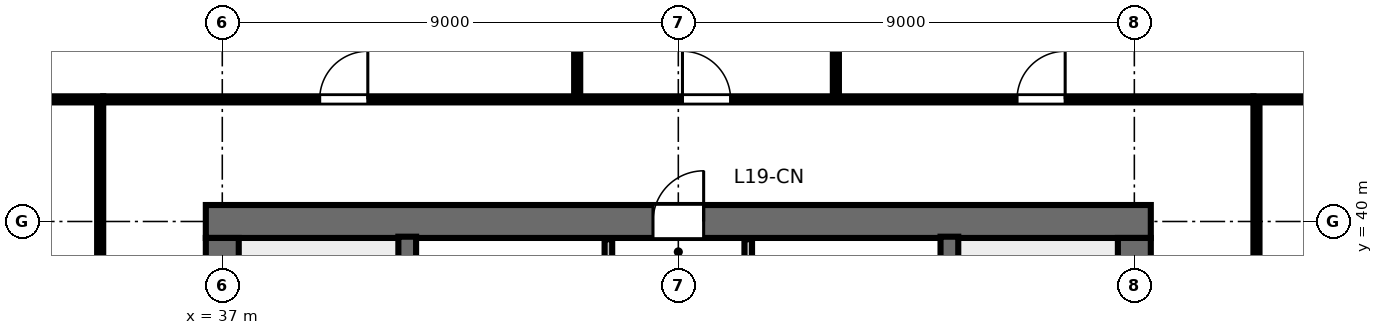
"""IFC4 building model, lengths in metres.
Left out: names, types, materials, properties, quantities, classifications, styles, units other than length and angle.
Written with IfcOpenShell. Run it as: python <this file> out.ifc"""

import sys

from ifc_helpers import new_model, si_unit, direction, frame, frame_2d, origin, place, context, subcontext, project, spatial, rectangle, extrude, element, fill, save


model = new_model("IFC4")
c1 = context("Model", 3, precision=1e-05, world=origin(), true_north=direction((0.0, 1.0)))
c2 = subcontext(c1, "Body", "Model", "MODEL_VIEW")
j1 = project(units=[si_unit("LENGTHUNIT", "METRE"), si_unit("PLANEANGLEUNIT", "RADIAN")], contexts=[c1])
p1 = place(None, origin())
s1 = spatial("IfcSite", under=j1, at=p1, CompositionType="ELEMENT")
p2 = place(p1, origin())
s2 = spatial("IfcBuilding", under=s1, at=p2, CompositionType="ELEMENT")
p3 = place(p2, frame((0.0, 0.0, 74.8)))
s3 = spatial("IfcBuildingStorey", under=s2, at=p3, CompositionType="ELEMENT", Elevation=74.8)
p4 = place(p3, frame((36.675, 40.0, 0.0), z_axis=(0.0, 0.0, 1.0), x_axis=(1.0, 0.0, 0.0)))
e1 = element("IfcWall", 1, at=p4, inside=s3, PredefinedType="SHEAR", context=c2, shape_type="SweptSolid", body=[
    extrude(rectangle(XDim=18.65, YDim=0.65, at=frame_2d((9.325, 0.0))), origin(), (0.0, 0.0, 1.0), 3.36),
])
p5 = place(p4, frame((8.825, 0.0, 0.0)))
e2 = element("IfcOpeningElement", 2, at=p5, cuts=e1, PredefinedType="OPENING", context=c2, shape_type="SweptSolid", body=[
    extrude(rectangle(XDim=1.0, YDim=2.15, at=frame_2d((0.5, 1.075))), frame((0.0, 0.335, 0.0), z_axis=(0.0, -1.0, 0.0), x_axis=(1.0, 0.0, 0.0)), (0.0, 0.0, 1.0), 0.67),
])
p6 = place(p3, frame((37.0, 24.325, 0.0), z_axis=(0.0, 0.0, 1.0), x_axis=(0.0, 1.0, 0.0)))
e3 = element("IfcWall", 3, at=p6, inside=s3, PredefinedType="SHEAR", context=c2, shape_type="SweptSolid", body=[
    extrude(rectangle(XDim=15.35, YDim=0.65, at=frame_2d((7.675, 0.0))), origin(), (0.0, 0.0, 1.0), 3.36),
])
p7 = place(p6, frame((5.2, 0.0, 0.0)))
e4 = element("IfcOpeningElement", 4, at=p7, cuts=e3, PredefinedType="OPENING", context=c2, shape_type="SweptSolid", body=[
    extrude(rectangle(XDim=1.15, YDim=2.15, at=frame_2d((0.575, 1.075))), frame((0.0, 0.335, 0.0), z_axis=(0.0, -1.0, 0.0), x_axis=(1.0, 0.0, 0.0)), (0.0, 0.0, 1.0), 0.67),
])
p8 = place(p3, frame((55.0, 24.325, 0.0), z_axis=(0.0, 0.0, 1.0), x_axis=(0.0, 1.0, 0.0)))
e5 = element("IfcWall", 5, at=p8, inside=s3, PredefinedType="SHEAR", context=c2, shape_type="SweptSolid", body=[
    extrude(rectangle(XDim=15.35, YDim=0.65, at=frame_2d((7.675, 0.0))), origin(), (0.0, 0.0, 1.0), 3.36),
])
p9 = place(p8, frame((5.2, 0.0, 0.0)))
e6 = element("IfcOpeningElement", 6, at=p9, cuts=e5, PredefinedType="OPENING", context=c2, shape_type="SweptSolid", body=[
    extrude(rectangle(XDim=1.15, YDim=2.15, at=frame_2d((0.575, 1.075))), frame((0.0, 0.335, 0.0), z_axis=(0.0, -1.0, 0.0), x_axis=(1.0, 0.0, 0.0)), (0.0, 0.0, 1.0), 0.67),
])
for number, where, z_axis, x_axis in (
    (7, (40.65, 32.0, 0.0), (0.0, 0.0, 1.0), (0.0, 1.0, 0.0)),
    (8, (51.35, 32.0, 0.0), (0.0, 0.0, 1.0), (0.0, 1.0, 0.0)),
):
    element("IfcWall", number, at=place(p3, frame(where, z_axis=z_axis, x_axis=x_axis)), inside=s3, PredefinedType="SHEAR", context=c2, shape_type="SweptSolid", body=[
        extrude(rectangle(XDim=7.7, YDim=0.35, at=frame_2d((3.85, 0.0))), origin(), (0.0, 0.0, 1.0), 3.6),
    ])
p10 = place(p3, frame((44.62, 35.72, 0.0), z_axis=(0.0, 0.0, 1.0), x_axis=(0.0, 1.0, 0.0)))
e9 = element("IfcWall", 9, at=p10, inside=s3, PredefinedType="PARTITIONING", context=c2, shape_type="SweptSolid", body=[
    extrude(rectangle(XDim=3.93, YDim=0.15, at=frame_2d((1.965, 0.0))), origin(), (0.0, 0.0, 1.0), 3.36),
])
p11 = place(p10, frame((1.5, 0.0, 0.0)))
e10 = element("IfcOpeningElement", 10, at=p11, cuts=e9, PredefinedType="OPENING", context=c2, shape_type="SweptSolid", body=[
    extrude(rectangle(XDim=0.9, YDim=2.15, at=frame_2d((0.45, 1.075))), frame((0.0, 0.085, 0.0), z_axis=(0.0, -1.0, 0.0), x_axis=(1.0, 0.0, 0.0)), (0.0, 0.0, 1.0), 0.17),
])
p12 = place(p3, frame((47.38, 35.72, 0.0), z_axis=(0.0, 0.0, 1.0), x_axis=(0.0, 1.0, 0.0)))
e11 = element("IfcWall", 11, at=p12, inside=s3, PredefinedType="PARTITIONING", context=c2, shape_type="SweptSolid", body=[
    extrude(rectangle(XDim=3.93, YDim=0.15, at=frame_2d((1.965, 0.0))), origin(), (0.0, 0.0, 1.0), 3.36),
])
p13 = place(p12, frame((1.5, 0.0, 0.0)))
e12 = element("IfcOpeningElement", 12, at=p13, cuts=e11, PredefinedType="OPENING", context=c2, shape_type="SweptSolid", body=[
    extrude(rectangle(XDim=0.9, YDim=2.15, at=frame_2d((0.45, 1.075))), frame((0.0, 0.085, 0.0), z_axis=(0.0, -1.0, 0.0), x_axis=(1.0, 0.0, 0.0)), (0.0, 0.0, 1.0), 0.17),
])
p14 = place(p3, frame((44.004, 42.41, 0.0), z_axis=(0.0, 0.0, 1.0), x_axis=(0.0, 1.0, 0.0)))
e13 = element("IfcWall", 13, at=p14, inside=s3, PredefinedType="PARTITIONING", context=c2, shape_type="SweptSolid", body=[
    extrude(rectangle(XDim=11.41, YDim=0.12, at=frame_2d((5.705, 0.0))), origin(), (0.0, 0.0, 1.0), 2.64),
])
p15 = place(p14, frame((1.4, 0.0, 0.0)))
e14 = element("IfcOpeningElement", 14, at=p15, cuts=e13, PredefinedType="OPENING", context=c2, shape_type="SweptSolid", body=[
    extrude(rectangle(XDim=0.9, YDim=2.15, at=frame_2d((0.45, 1.075))), frame((0.0, 0.07, 0.0), z_axis=(0.0, -1.0, 0.0), x_axis=(1.0, 0.0, 0.0)), (0.0, 0.0, 1.0), 0.14),
])
p16 = place(p3, frame((49.11, 42.41, 0.0), z_axis=(0.0, 0.0, 1.0), x_axis=(0.0, 1.0, 0.0)))
e15 = element("IfcWall", 15, at=p16, inside=s3, PredefinedType="PARTITIONING", context=c2, shape_type="SweptSolid", body=[
    extrude(rectangle(XDim=11.41, YDim=0.12, at=frame_2d((5.705, 0.0))), origin(), (0.0, 0.0, 1.0), 2.64),
])
p17 = place(p16, frame((1.4, 0.0, 0.0)))
e16 = element("IfcOpeningElement", 16, at=p17, cuts=e15, PredefinedType="OPENING", context=c2, shape_type="SweptSolid", body=[
    extrude(rectangle(XDim=0.9, YDim=2.15, at=frame_2d((0.45, 1.075))), frame((0.0, 0.07, 0.0), z_axis=(0.0, -1.0, 0.0), x_axis=(1.0, 0.0, 0.0)), (0.0, 0.0, 1.0), 0.14),
])
p18 = place(p3, frame((34.65, 42.41, 0.0), z_axis=(0.0, 0.0, 1.0), x_axis=(1.0, 0.0, 0.0)))
e17 = element("IfcWall", 17, at=p18, inside=s3, PredefinedType="PARTITIONING", context=c2, shape_type="SweptSolid", body=[
    extrude(rectangle(XDim=22.7, YDim=0.12, at=frame_2d((11.35, 0.0))), origin(), (0.0, 0.0, 1.0), 2.64),
])
p19 = place(p18, frame((4.272, 0.0, 0.0)))
e18 = element("IfcOpeningElement", 18, at=p19, cuts=e17, PredefinedType="OPENING", context=c2, shape_type="SweptSolid", body=[
    extrude(rectangle(XDim=0.95, YDim=2.15, at=frame_2d((0.475, 1.075))), frame((0.0, 0.07, 0.0), z_axis=(0.0, -1.0, 0.0), x_axis=(1.0, 0.0, 0.0)), (0.0, 0.0, 1.0), 0.14),
])
p20 = place(p18, frame((11.432, 0.0, 0.0)))
e19 = element("IfcOpeningElement", 19, at=p20, cuts=e17, PredefinedType="OPENING", context=c2, shape_type="SweptSolid", body=[
    extrude(rectangle(XDim=0.95, YDim=2.15, at=frame_2d((0.475, 1.075))), frame((0.0, 0.07, 0.0), z_axis=(0.0, -1.0, 0.0), x_axis=(1.0, 0.0, 0.0)), (0.0, 0.0, 1.0), 0.14),
])
p21 = place(p18, frame((18.035, 0.0, 0.0)))
e20 = element("IfcOpeningElement", 20, at=p21, cuts=e17, PredefinedType="OPENING", context=c2, shape_type="SweptSolid", body=[
    extrude(rectangle(XDim=0.95, YDim=2.15, at=frame_2d((0.475, 1.075))), frame((0.0, 0.07, 0.0), z_axis=(0.0, -1.0, 0.0), x_axis=(1.0, 0.0, 0.0)), (0.0, 0.0, 1.0), 0.14),
])
p22 = place(p3, frame((34.59, 21.65, 0.0), z_axis=(0.0, 0.0, 1.0), x_axis=(0.0, 1.0, 0.0)))
e21 = element("IfcWall", 21, at=p22, inside=s3, PredefinedType="PARTITIONING", context=c2, shape_type="SweptSolid", body=[
    extrude(rectangle(XDim=20.7, YDim=0.12, at=frame_2d((10.35, 0.0))), origin(), (0.0, 0.0, 1.0), 2.64),
])
p23 = place(p22, frame((2.105, 0.0, 0.0)))
e22 = element("IfcOpeningElement", 22, at=p23, cuts=e21, PredefinedType="OPENING", context=c2, shape_type="SweptSolid", body=[
    extrude(rectangle(XDim=0.95, YDim=2.15, at=frame_2d((0.475, 1.075))), frame((0.0, 0.07, 0.0), z_axis=(0.0, -1.0, 0.0), x_axis=(1.0, 0.0, 0.0)), (0.0, 0.0, 1.0), 0.14),
])
p24 = place(p22, frame((7.369, 0.0, 0.0)))
e23 = element("IfcOpeningElement", 23, at=p24, cuts=e21, PredefinedType="OPENING", context=c2, shape_type="SweptSolid", body=[
    extrude(rectangle(XDim=0.95, YDim=2.15, at=frame_2d((0.475, 1.075))), frame((0.0, 0.07, 0.0), z_axis=(0.0, -1.0, 0.0), x_axis=(1.0, 0.0, 0.0)), (0.0, 0.0, 1.0), 0.14),
])
p25 = place(p22, frame((15.139, 0.0, 0.0)))
e24 = element("IfcOpeningElement", 24, at=p25, cuts=e21, PredefinedType="OPENING", context=c2, shape_type="SweptSolid", body=[
    extrude(rectangle(XDim=0.95, YDim=2.15, at=frame_2d((0.475, 1.075))), frame((0.0, 0.07, 0.0), z_axis=(0.0, -1.0, 0.0), x_axis=(1.0, 0.0, 0.0)), (0.0, 0.0, 1.0), 0.14),
])
p26 = place(p3, frame((57.41, 21.65, 0.0), z_axis=(0.0, 0.0, 1.0), x_axis=(0.0, 1.0, 0.0)))
e25 = element("IfcWall", 25, at=p26, inside=s3, PredefinedType="PARTITIONING", context=c2, shape_type="SweptSolid", body=[
    extrude(rectangle(XDim=20.7, YDim=0.12, at=frame_2d((10.35, 0.0))), origin(), (0.0, 0.0, 1.0), 2.64),
])
p27 = place(p26, frame((4.931, 0.0, 0.0)))
e26 = element("IfcOpeningElement", 26, at=p27, cuts=e25, PredefinedType="OPENING", context=c2, shape_type="SweptSolid", body=[
    extrude(rectangle(XDim=0.95, YDim=2.15, at=frame_2d((0.475, 1.075))), frame((0.0, 0.07, 0.0), z_axis=(0.0, -1.0, 0.0), x_axis=(1.0, 0.0, 0.0)), (0.0, 0.0, 1.0), 0.14),
])
p28 = place(p26, frame((15.081, 0.0, 0.0)))
e27 = element("IfcOpeningElement", 27, at=p28, cuts=e25, PredefinedType="OPENING", context=c2, shape_type="SweptSolid", body=[
    extrude(rectangle(XDim=0.95, YDim=2.15, at=frame_2d((0.475, 1.075))), frame((0.0, 0.07, 0.0), z_axis=(0.0, -1.0, 0.0), x_axis=(1.0, 0.0, 0.0)), (0.0, 0.0, 1.0), 0.14),
])
for number, where, z_axis, x_axis in (
    (28, (34.65, 42.41, 0.0), (0.0, 0.0, 1.0), (-1.0, 0.0, 0.0)),
    (29, (57.35, 42.41, 0.0), (0.0, 0.0, 1.0), (1.0, 0.0, 0.0)),
):
    element("IfcWall", number, at=place(p3, frame(where, z_axis=z_axis, x_axis=x_axis)), inside=s3, PredefinedType="PARTITIONING", context=c2, shape_type="SweptSolid", body=[
        extrude(rectangle(XDim=13.47, YDim=0.12, at=frame_2d((6.735, 0.0))), origin(), (0.0, 0.0, 1.0), 2.64),
    ])
p29 = place(p5, origin())
e30 = element("IfcDoor", 30, at=p29, inside=s3, OperationType="SINGLE_SWING_RIGHT", PredefinedType="DOOR", context=c2, shape_type="SweptSolid", body=[
    extrude(rectangle(XDim=1.0, YDim=2.15, at=frame_2d((0.5, 1.075))), frame((0.0, 0.025, 0.0), z_axis=(0.0, -1.0, 0.0), x_axis=(1.0, 0.0, 0.0)), (0.0, 0.0, 1.0), 0.05),
])
fill(e2, e30)
p30 = place(p19, origin())
e31 = element("IfcDoor", 31, at=p30, inside=s3, OperationType="SINGLE_SWING_RIGHT", PredefinedType="DOOR", context=c2, shape_type="SweptSolid", body=[
    extrude(rectangle(XDim=0.95, YDim=2.15, at=frame_2d((0.475, 1.075))), frame((0.0, 0.025, 0.0), z_axis=(0.0, -1.0, 0.0), x_axis=(1.0, 0.0, 0.0)), (0.0, 0.0, 1.0), 0.05),
])
fill(e18, e31)
p31 = place(p20, origin())
e32 = element("IfcDoor", 32, at=p31, inside=s3, OperationType="SINGLE_SWING_LEFT", PredefinedType="DOOR", context=c2, shape_type="SweptSolid", body=[
    extrude(rectangle(XDim=0.95, YDim=2.15, at=frame_2d((0.475, 1.075))), frame((0.0, 0.025, 0.0), z_axis=(0.0, -1.0, 0.0), x_axis=(1.0, 0.0, 0.0)), (0.0, 0.0, 1.0), 0.05),
])
fill(e19, e32)
p32 = place(p21, origin())
e33 = element("IfcDoor", 33, at=p32, inside=s3, OperationType="SINGLE_SWING_RIGHT", PredefinedType="DOOR", context=c2, shape_type="SweptSolid", body=[
    extrude(rectangle(XDim=0.95, YDim=2.15, at=frame_2d((0.475, 1.075))), frame((0.0, 0.025, 0.0), z_axis=(0.0, -1.0, 0.0), x_axis=(1.0, 0.0, 0.0)), (0.0, 0.0, 1.0), 0.05),
])
fill(e20, e33)
save(model, sys.argv[1])
